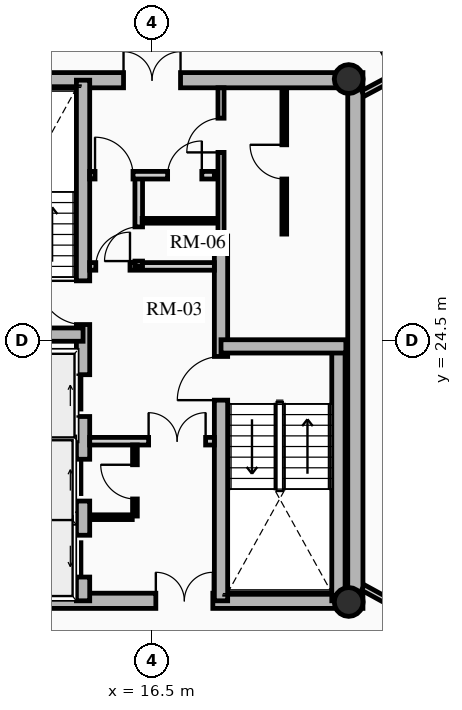
"""IFC4 building model, lengths in metres.
Left out: names, types, materials, properties, quantities, classifications, styles, units other than length and angle.
Written with IfcOpenShell. Run it as: python <this file> out.ifc"""

import sys

from ifc_helpers import new_model, si_unit, direction, frame, frame_2d, origin, origin_2d, place, context, subcontext, project, spatial, rectangle, hollow_circle, extrude, source, transform, mapped, element, fill, save


model = new_model("IFC4")
c1 = context("Model", 3, precision=1e-05, world=origin(), true_north=direction((0.0, 1.0)))
c2 = subcontext(c1, "Body", "Model", "MODEL_VIEW")
j1 = project(units=[si_unit("LENGTHUNIT", "METRE"), si_unit("PLANEANGLEUNIT", "RADIAN")], contexts=[c1])
p1 = place(None, origin())
s1 = spatial("IfcSite", under=j1, at=p1, CompositionType="ELEMENT")
p2 = place(p1, origin())
s2 = spatial("IfcBuilding", under=s1, at=p2, CompositionType="ELEMENT")
p3 = place(p2, frame((0.0, 0.0, 186.52)))
s3 = spatial("IfcBuildingStorey", under=s2, at=p3, CompositionType="ELEMENT", Elevation=186.52)
p4 = place(p3, frame((21.85, 17.45, 0.0), z_axis=(0.0, 0.0, 1.0), x_axis=(0.0, 1.0, 0.0)))
e1 = element("IfcWall", 1, at=p4, inside=s3, PredefinedType="SHEAR", context=c2, shape_type="SweptSolid", body=[
    extrude(rectangle(XDim=14.1, YDim=0.4, at=frame_2d((7.05, 0.0))), origin(), (0.0, 0.0, 1.0), 2.91),
])
p5 = place(p3, frame((11.15, 17.65, 0.0), z_axis=(0.0, 0.0, 1.0), x_axis=(1.0, 0.0, 0.0)))
e2 = element("IfcWall", 2, at=p5, inside=s3, PredefinedType="SHEAR", context=c2, shape_type="SweptSolid", body=[
    extrude(rectangle(XDim=10.7, YDim=0.4, at=frame_2d((5.35, 0.0))), origin(), (0.0, 0.0, 1.0), 2.91),
])
m1 = source(origin(), c2, "Body", "SweptSolid", [
    extrude(rectangle(XDim=1.5, YDim=2.02, at=frame_2d((0.75, 1.01))), frame((0.0, 0.21, 0.0), z_axis=(0.0, -1.0, 0.0), x_axis=(1.0, 0.0, 0.0)), (0.0, 0.0, 1.0), 0.42),
])
p6 = place(p5, frame((5.45, 0.0, 0.0)))
e3 = element("IfcOpeningElement", 3, at=p6, cuts=e2, PredefinedType="OPENING", context=c2, shape_type="MappedRepresentation", body=[
    mapped(m1, transform((0.0, 0.0, 0.0), x_axis=(1.0, 0.0, 0.0), y_axis=(0.0, 1.0, 0.0), z_axis=(0.0, 0.0, 1.0), scale=1.0)),
])
p7 = place(p3, frame((11.15, 31.35, 0.0), z_axis=(0.0, 0.0, 1.0), x_axis=(1.0, 0.0, 0.0)))
e4 = element("IfcWall", 4, at=p7, inside=s3, PredefinedType="SHEAR", context=c2, shape_type="SweptSolid", body=[
    extrude(rectangle(XDim=10.7, YDim=0.4, at=frame_2d((5.35, 0.0))), origin(), (0.0, 0.0, 1.0), 2.91),
])
p8 = place(p7, frame((4.6, 0.0, 0.0)))
e5 = element("IfcOpeningElement", 5, at=p8, cuts=e4, PredefinedType="OPENING", context=c2, shape_type="MappedRepresentation", body=[
    mapped(m1, transform((0.0, 0.0, 0.0), x_axis=(1.0, 0.0, 0.0), y_axis=(0.0, 1.0, 0.0), z_axis=(0.0, 0.0, 1.0), scale=1.0)),
])
p9 = place(p3, frame((14.685, 17.65, 0.0), z_axis=(0.0, 0.0, 1.0), x_axis=(0.0, 1.0, 0.0)))
e6 = element("IfcWall", 6, at=p9, inside=s3, PredefinedType="SHEAR", context=c2, shape_type="SweptSolid", body=[
    extrude(rectangle(XDim=13.7, YDim=0.35, at=frame_2d((6.85, 0.0))), origin(), (0.0, 0.0, 1.0), 2.91),
])
m2 = source(origin(), c2, "Body", "SweptSolid", [
    extrude(rectangle(XDim=1.1, YDim=2.015, at=frame_2d((0.55, 1.007))), frame((0.0, 0.185, 0.0), z_axis=(0.0, -1.0, 0.0), x_axis=(1.0, 0.0, 0.0)), (0.0, 0.0, 1.0), 0.37),
])
p10 = place(p9, frame((4.85, 0.0, 0.0)))
e7 = element("IfcOpeningElement", 7, at=p10, cuts=e6, PredefinedType="OPENING", context=c2, shape_type="MappedRepresentation", body=[
    mapped(m2, transform((0.0, 0.0, 0.0), x_axis=(1.0, 0.0, 0.0), y_axis=(0.0, 1.0, 0.0), z_axis=(0.0, 0.0, 1.0), scale=1.0)),
])
p11 = place(p9, frame((0.625, 0.0, 0.0)))
e8 = element("IfcOpeningElement", 8, at=p11, cuts=e6, PredefinedType="OPENING", context=c2, shape_type="MappedRepresentation", body=[
    mapped(m2, transform((0.0, 0.0, 0.0), x_axis=(1.0, 0.0, 0.0), y_axis=(0.0, 1.0, 0.0), z_axis=(0.0, 0.0, 1.0), scale=1.0)),
])
p12 = place(p9, frame((2.625, 0.0, 0.0)))
e9 = element("IfcOpeningElement", 9, at=p12, cuts=e6, PredefinedType="OPENING", context=c2, shape_type="MappedRepresentation", body=[
    mapped(m2, transform((0.0, 0.0, 0.0), x_axis=(1.0, 0.0, 0.0), y_axis=(0.0, 1.0, 0.0), z_axis=(0.0, 0.0, 1.0), scale=1.0)),
])
m3 = source(origin(), c2, "Body", "SweptSolid", [
    extrude(rectangle(XDim=1.15, YDim=2.02, at=frame_2d((0.575, 1.01))), frame((0.0, 0.185, 0.0), z_axis=(0.0, -1.0, 0.0), x_axis=(1.0, 0.0, 0.0)), (0.0, 0.0, 1.0), 0.37),
])
p13 = place(p9, frame((7.27, 0.0, 0.0)))
e10 = element("IfcOpeningElement", 10, at=p13, cuts=e6, PredefinedType="OPENING", context=c2, shape_type="MappedRepresentation", body=[
    mapped(m3, transform((0.0, 0.0, 0.0), x_axis=(1.0, 0.0, 0.0), y_axis=(0.0, 1.0, 0.0), z_axis=(0.0, 0.0, 1.0), scale=1.0)),
])
p14 = place(p3, frame((18.315, 17.65, 0.0), z_axis=(0.0, 0.0, 1.0), x_axis=(0.0, 1.0, 0.0)))
e11 = element("IfcWall", 11, at=p14, inside=s3, PredefinedType="SHEAR", context=c2, shape_type="SweptSolid", body=[
    extrude(rectangle(XDim=9.6, YDim=0.35, at=frame_2d((4.8, 0.0))), origin(), (0.0, 0.0, 1.0), 2.91),
])
p15 = place(p14, frame((5.28, 0.0, 0.0)))
e12 = element("IfcOpeningElement", 12, at=p15, cuts=e11, PredefinedType="OPENING", context=c2, shape_type="MappedRepresentation", body=[
    mapped(m3, transform((0.0, 0.0, 0.0), x_axis=(1.0, 0.0, 0.0), y_axis=(0.0, 1.0, 0.0), z_axis=(0.0, 0.0, 1.0), scale=1.0)),
])
p16 = place(p3, frame((11.4, 24.655, 0.0), z_axis=(0.0, 0.0, 1.0), x_axis=(1.0, 0.0, 0.0)))
e13 = element("IfcWall", 13, at=p16, inside=s3, PredefinedType="SHEAR", context=c2, shape_type="SweptSolid", body=[
    extrude(rectangle(XDim=3.285, YDim=0.35, at=frame_2d((1.643, 0.0))), origin(), (0.0, 0.0, 1.0), 2.91),
])
p17 = place(p3, frame((21.405, 17.65, 0.0), z_axis=(0.0, 0.0, 1.0), x_axis=(0.0, 1.0, 0.0)))
e14 = element("IfcWall", 14, at=p17, inside=s3, PredefinedType="SHEAR", context=c2, shape_type="SweptSolid", body=[
    extrude(rectangle(XDim=6.695, YDim=0.35, at=frame_2d((3.348, 0.0))), origin(), (0.0, 0.0, 1.0), 2.91),
])
p18 = place(p3, frame((18.315, 24.345, 0.0), z_axis=(0.0, 0.0, 1.0), x_axis=(1.0, 0.0, 0.0)))
e15 = element("IfcWall", 15, at=p18, inside=s3, PredefinedType="SHEAR", context=c2, shape_type="SweptSolid", body=[
    extrude(rectangle(XDim=3.285, YDim=0.35, at=frame_2d((1.643, 0.0))), origin(), (0.0, 0.0, 1.0), 2.91),
])
for number, where, z_axis, x_axis in (
    (16, (21.675, 17.62, 0.0), (0.0, 0.0, 1.0), (1.0, 0.0, 0.0)),
    (17, (21.675, 31.38, 0.0), (0.0, 0.0, 1.0), (1.0, 0.0, 0.0)),
):
    element("IfcColumn", number, at=place(p3, frame(where, z_axis=z_axis, x_axis=x_axis)), inside=s3, PredefinedType="COLUMN", context=c2, shape_type="SweptSolid", body=[
        extrude(hollow_circle(Radius=0.38, WallThickness=0.032, at=origin_2d()), origin(), (0.0, 0.0, 1.0), 2.91),
    ])
for number, where, z_axis, x_axis in (
    (18, (11.52, 21.8, 0.0), (0.0, 0.0, 1.0), (1.0, 0.0, 0.0)),
    (19, (11.52, 19.825, 0.0), (0.0, 0.0, 1.0), (1.0, 0.0, 0.0)),
):
    element("IfcWall", number, at=place(p3, frame(where, z_axis=z_axis, x_axis=x_axis)), inside=s3, PredefinedType="SHEAR", context=c2, shape_type="SweptSolid", body=[
        extrude(rectangle(XDim=2.97, YDim=0.2, at=frame_2d((1.485, 0.0))), origin(), (0.0, 0.0, 1.0), 2.91),
    ])
p19 = place(p3, frame((14.86, 21.85, 0.0), z_axis=(0.0, 0.0, 1.0), x_axis=(1.0, 0.0, 0.0)))
e20 = element("IfcWall", 20, at=p19, inside=s3, PredefinedType="PARTITIONING", context=c2, shape_type="SweptSolid", body=[
    extrude(rectangle(XDim=3.28, YDim=0.2, at=frame_2d((1.64, 0.0))), origin(), (0.0, 0.0, 1.0), 2.675),
])
m4 = source(origin(), c2, "Body", "SweptSolid", [
    extrude(rectangle(XDim=1.5, YDim=2.02, at=frame_2d((0.75, 1.01))), frame((0.0, 0.11, 0.0), z_axis=(0.0, -1.0, 0.0), x_axis=(1.0, 0.0, 0.0)), (0.0, 0.0, 1.0), 0.22),
])
p20 = place(p19, frame((1.55, 0.0, 0.0)))
e21 = element("IfcOpeningElement", 21, at=p20, cuts=e20, PredefinedType="OPENING", context=c2, shape_type="MappedRepresentation", body=[
    mapped(m4, transform((0.0, 0.0, 0.0), x_axis=(1.0, 0.0, 0.0), y_axis=(0.0, 1.0, 0.0), z_axis=(0.0, 0.0, 1.0), scale=1.0)),
])
p21 = place(p3, frame((14.86, 26.45, 0.0), z_axis=(0.0, 0.0, 1.0), x_axis=(1.0, 0.0, 0.0)))
e22 = element("IfcWall", 22, at=p21, inside=s3, PredefinedType="PARTITIONING", context=c2, shape_type="SweptSolid", body=[
    extrude(rectangle(XDim=3.28, YDim=0.2, at=frame_2d((1.64, 0.0))), origin(), (0.0, 0.0, 1.0), 2.675),
])
m5 = source(origin(), c2, "Body", "SweptSolid", [
    extrude(rectangle(XDim=0.9, YDim=2.005, at=frame_2d((0.45, 1.002))), frame((0.0, 0.11, 0.0), z_axis=(0.0, -1.0, 0.0), x_axis=(1.0, 0.0, 0.0)), (0.0, 0.0, 1.0), 0.22),
])
p22 = place(p21, frame((0.16, 0.0, 0.0)))
e23 = element("IfcOpeningElement", 23, at=p22, cuts=e22, PredefinedType="OPENING", context=c2, shape_type="MappedRepresentation", body=[
    mapped(m5, transform((0.0, 0.0, 0.0), x_axis=(1.0, 0.0, 0.0), y_axis=(0.0, 1.0, 0.0), z_axis=(0.0, 0.0, 1.0), scale=1.0)),
])
p23 = place(p3, frame((16.15, 26.45, 0.0), z_axis=(0.0, 0.0, 1.0), x_axis=(0.0, 1.0, 0.0)))
e24 = element("IfcWall", 24, at=p23, inside=s3, PredefinedType="PARTITIONING", context=c2, shape_type="SweptSolid", body=[
    extrude(rectangle(XDim=2.4, YDim=0.2, at=frame_2d((1.2, 0.0))), origin(), (0.0, 0.0, 1.0), 2.675),
])
p24 = place(p23, frame((0.14, 0.0, 0.0)))
e25 = element("IfcOpeningElement", 25, at=p24, cuts=e24, PredefinedType="OPENING", context=c2, shape_type="MappedRepresentation", body=[
    mapped(m5, transform((0.0, 0.0, 0.0), x_axis=(1.0, 0.0, 0.0), y_axis=(0.0, 1.0, 0.0), z_axis=(0.0, 0.0, 1.0), scale=1.0)),
])
p25 = place(p3, frame((14.86, 28.85, 0.0), z_axis=(0.0, 0.0, 1.0), x_axis=(1.0, 0.0, 0.0)))
e26 = element("IfcWall", 26, at=p25, inside=s3, PredefinedType="PARTITIONING", context=c2, shape_type="SweptSolid", body=[
    extrude(rectangle(XDim=3.28, YDim=0.2, at=frame_2d((1.64, 0.0))), origin(), (0.0, 0.0, 1.0), 2.675),
])
m6 = source(origin(), c2, "Body", "SweptSolid", [
    extrude(rectangle(XDim=1.0, YDim=2.015, at=frame_2d((0.5, 1.007))), frame((0.0, 0.11, 0.0), z_axis=(0.0, -1.0, 0.0), x_axis=(1.0, 0.0, 0.0)), (0.0, 0.0, 1.0), 0.22),
])
p26 = place(p25, frame((0.14, 0.0, 0.0)))
e27 = element("IfcOpeningElement", 27, at=p26, cuts=e26, PredefinedType="OPENING", context=c2, shape_type="MappedRepresentation", body=[
    mapped(m6, transform((0.0, 0.0, 0.0), x_axis=(1.0, 0.0, 0.0), y_axis=(0.0, 1.0, 0.0), z_axis=(0.0, 0.0, 1.0), scale=1.0)),
])
p27 = place(p25, frame((2.05, 0.0, 0.0)))
e28 = element("IfcOpeningElement", 28, at=p27, cuts=e26, PredefinedType="OPENING", context=c2, shape_type="MappedRepresentation", body=[
    mapped(m5, transform((0.0, 0.0, 0.0), x_axis=(1.0, 0.0, 0.0), y_axis=(0.0, 1.0, 0.0), z_axis=(0.0, 0.0, 1.0), scale=1.0)),
])
p28 = place(p3, frame((16.05, 19.88, 0.0), z_axis=(0.0, 0.0, 1.0), x_axis=(0.0, 1.0, 0.0)))
e29 = element("IfcWall", 29, at=p28, inside=s3, PredefinedType="PARTITIONING", context=c2, shape_type="SweptSolid", body=[
    extrude(rectangle(XDim=1.87, YDim=0.125, at=frame_2d((0.935, 0.0))), origin(), (0.0, 0.0, 1.0), 2.675),
])
m7 = source(origin(), c2, "Body", "SweptSolid", [
    extrude(rectangle(XDim=0.9, YDim=2.005, at=frame_2d((0.45, 1.002))), frame((0.0, 0.073, 0.0), z_axis=(0.0, -1.0, 0.0), x_axis=(1.0, 0.0, 0.0)), (0.0, 0.0, 1.0), 0.145),
])
p29 = place(p28, frame((0.45, 0.0, 0.0)))
e30 = element("IfcOpeningElement", 30, at=p29, cuts=e29, PredefinedType="OPENING", context=c2, shape_type="MappedRepresentation", body=[
    mapped(m7, transform((0.0, 0.0, 0.0), x_axis=(1.0, 0.0, 0.0), y_axis=(0.0, 1.0, 0.0), z_axis=(0.0, 0.0, 1.0), scale=1.0)),
])
p30 = place(p3, frame((14.88, 19.85, 0.0), z_axis=(0.0, 0.0, 1.0), x_axis=(1.0, 0.0, 0.0)))
e31 = element("IfcWall", 31, at=p30, inside=s3, PredefinedType="PARTITIONING", context=c2, shape_type="SweptSolid", body=[
    extrude(rectangle(XDim=1.1, YDim=0.125, at=frame_2d((0.55, 0.0))), origin(), (0.0, 0.0, 1.0), 2.675),
])
p31 = place(p3, frame((16.24, 27.65, 0.0), z_axis=(0.0, 0.0, 1.0), x_axis=(1.0, 0.0, 0.0)))
e32 = element("IfcWall", 32, at=p31, inside=s3, PredefinedType="PARTITIONING", context=c2, shape_type="SweptSolid", body=[
    extrude(rectangle(XDim=1.88, YDim=0.125, at=frame_2d((0.94, 0.0))), origin(), (0.0, 0.0, 1.0), 2.675),
])
p32 = place(p3, frame((18.315, 27.25, 0.0), z_axis=(0.0, 0.0, 1.0), x_axis=(0.0, 1.0, 0.0)))
e33 = element("IfcWall", 33, at=p32, inside=s3, PredefinedType="PARTITIONING", context=c2, shape_type="SweptSolid", body=[
    extrude(rectangle(XDim=3.9, YDim=0.16, at=frame_2d((1.95, 0.0))), origin(), (0.0, 0.0, 1.0), 2.675),
])
m8 = source(origin(), c2, "Body", "SweptSolid", [
    extrude(rectangle(XDim=0.9, YDim=2.005, at=frame_2d((0.45, 1.002))), frame((0.0, 0.09, 0.0), z_axis=(0.0, -1.0, 0.0), x_axis=(1.0, 0.0, 0.0)), (0.0, 0.0, 1.0), 0.18),
])
p33 = place(p32, frame((2.2, 0.0, 0.0)))
e34 = element("IfcOpeningElement", 34, at=p33, cuts=e33, PredefinedType="OPENING", context=c2, shape_type="MappedRepresentation", body=[
    mapped(m8, transform((0.0, 0.0, 0.0), x_axis=(1.0, 0.0, 0.0), y_axis=(0.0, 1.0, 0.0), z_axis=(0.0, 0.0, 1.0), scale=1.0)),
])
p34 = place(p3, frame((19.98, 27.3, 0.0), z_axis=(0.0, 0.0, 1.0), x_axis=(0.0, 1.0, 0.0)))
e35 = element("IfcWall", 35, at=p34, inside=s3, PredefinedType="PARTITIONING", context=c2, shape_type="SweptSolid", body=[
    extrude(rectangle(XDim=3.82, YDim=0.125, at=frame_2d((1.91, 0.0))), origin(), (0.0, 0.0, 1.0), 2.675),
])
p35 = place(p34, frame((1.45, 0.0, 0.0)))
e36 = element("IfcOpeningElement", 36, at=p35, cuts=e35, PredefinedType="OPENING", context=c2, shape_type="MappedRepresentation", body=[
    mapped(m7, transform((0.0, 0.0, 0.0), x_axis=(1.0, 0.0, 0.0), y_axis=(0.0, 1.0, 0.0), z_axis=(0.0, 0.0, 1.0), scale=1.0)),
])
p36 = place(p3, frame((22.05, 31.0, 0.0), z_axis=(0.0, 0.0, 1.0), x_axis=(0.882791584709, 0.469764853908, 0.0)))
e37 = element("IfcWall", 37, at=p36, inside=s3, PredefinedType="PARTITIONING", context=c2, shape_type="SweptSolid", body=[
    extrude(rectangle(XDim=2.186, YDim=0.16, at=frame_2d((1.093, 0.0))), origin(), (0.0, 0.0, 1.0), 2.245),
])
m9 = source(origin(), c2, "Body", "SweptSolid", [
    extrude(rectangle(XDim=1.05, YDim=2.015, at=frame_2d((0.525, 1.007))), frame((0.0, 0.09, 0.0), z_axis=(0.0, -1.0, 0.0), x_axis=(1.0, 0.0, 0.0)), (0.0, 0.0, 1.0), 0.18),
])
p37 = place(p36, frame((0.936, 0.0, 0.0)))
e38 = element("IfcOpeningElement", 38, at=p37, cuts=e37, PredefinedType="OPENING", context=c2, shape_type="MappedRepresentation", body=[
    mapped(m9, transform((0.0, 0.0, 0.0), x_axis=(1.0, 0.0, 0.0), y_axis=(0.0, 1.0, 0.0), z_axis=(0.0, 0.0, 1.0), scale=1.0)),
])
p38 = place(p3, frame((22.05, 18.0, 0.0), z_axis=(0.0, 0.0, 1.0), x_axis=(0.877252891813, -0.480028503118, 0.0)))
e39 = element("IfcWall", 39, at=p38, inside=s3, PredefinedType="PARTITIONING", context=c2, shape_type="SweptSolid", body=[
    extrude(rectangle(XDim=2.282, YDim=0.16, at=frame_2d((1.141, 0.0))), origin(), (0.0, 0.0, 1.0), 2.245),
])
p39 = place(p38, frame((1.032, 0.0, 0.0)))
e40 = element("IfcOpeningElement", 40, at=p39, cuts=e39, PredefinedType="OPENING", context=c2, shape_type="MappedRepresentation", body=[
    mapped(m9, transform((0.0, 0.0, 0.0), x_axis=(1.0, 0.0, 0.0), y_axis=(0.0, 1.0, 0.0), z_axis=(0.0, 0.0, 1.0), scale=1.0)),
])
m10 = source(origin(), c2, "Body", "SweptSolid", [
    extrude(rectangle(XDim=1.1, YDim=2.015, at=frame_2d((0.55, 1.007))), frame((0.0, 0.025, 0.0), z_axis=(0.0, -1.0, 0.0), x_axis=(1.0, 0.0, 0.0)), (0.0, 0.0, 1.0), 0.05),
])
p40 = place(p10, origin())
e41 = element("IfcDoor", 41, at=p40, inside=s3, OperationType="SLIDING_TO_RIGHT", PredefinedType="DOOR", context=c2, shape_type="MappedRepresentation", body=[
    mapped(m10, transform((0.0, 0.0, 0.0), x_axis=(1.0, 0.0, 0.0), y_axis=(0.0, 1.0, 0.0), z_axis=(0.0, 0.0, 1.0), scale=1.0)),
])
fill(e7, e41)
p41 = place(p11, origin())
e42 = element("IfcDoor", 42, at=p41, inside=s3, OperationType="SLIDING_TO_LEFT", PredefinedType="DOOR", context=c2, shape_type="MappedRepresentation", body=[
    mapped(m10, transform((0.0, 0.0, 0.0), x_axis=(1.0, 0.0, 0.0), y_axis=(0.0, 1.0, 0.0), z_axis=(0.0, 0.0, 1.0), scale=1.0)),
])
fill(e8, e42)
p42 = place(p12, origin())
e43 = element("IfcDoor", 43, at=p42, inside=s3, OperationType="SLIDING_TO_RIGHT", PredefinedType="DOOR", context=c2, shape_type="MappedRepresentation", body=[
    mapped(m10, transform((0.0, 0.0, 0.0), x_axis=(1.0, 0.0, 0.0), y_axis=(0.0, 1.0, 0.0), z_axis=(0.0, 0.0, 1.0), scale=1.0)),
])
fill(e9, e43)
m11 = source(origin(), c2, "Body", "SweptSolid", [
    extrude(rectangle(XDim=1.15, YDim=2.02, at=frame_2d((0.575, 1.01))), frame((0.0, 0.025, 0.0), z_axis=(0.0, -1.0, 0.0), x_axis=(1.0, 0.0, 0.0)), (0.0, 0.0, 1.0), 0.05),
])
p43 = place(p13, origin())
e44 = element("IfcDoor", 44, at=p43, inside=s3, OperationType="SINGLE_SWING_RIGHT", PredefinedType="DOOR", context=c2, shape_type="MappedRepresentation", body=[
    mapped(m11, transform((0.0, 0.0, 0.0), x_axis=(1.0, 0.0, 0.0), y_axis=(0.0, 1.0, 0.0), z_axis=(0.0, 0.0, 1.0), scale=1.0)),
])
fill(e10, e44)
p44 = place(p15, origin())
e45 = element("IfcDoor", 45, at=p44, inside=s3, OperationType="SINGLE_SWING_LEFT", PredefinedType="DOOR", context=c2, shape_type="MappedRepresentation", body=[
    mapped(m11, transform((0.0, 0.0, 0.0), x_axis=(1.0, 0.0, 0.0), y_axis=(0.0, 1.0, 0.0), z_axis=(0.0, 0.0, 1.0), scale=1.0)),
])
fill(e12, e45)
m12 = source(origin(), c2, "Body", "SweptSolid", [
    extrude(rectangle(XDim=1.5, YDim=2.02, at=frame_2d((0.75, 1.01))), frame((0.0, 0.025, 0.0), z_axis=(0.0, -1.0, 0.0), x_axis=(1.0, 0.0, 0.0)), (0.0, 0.0, 1.0), 0.05),
])
p45 = place(p8, origin())
e46 = element("IfcDoor", 46, at=p45, inside=s3, OperationType="DOUBLE_DOOR_SINGLE_SWING", PredefinedType="DOOR", context=c2, shape_type="MappedRepresentation", body=[
    mapped(m12, transform((0.0, 0.0, 0.0), x_axis=(1.0, 0.0, 0.0), y_axis=(0.0, 1.0, 0.0), z_axis=(0.0, 0.0, 1.0), scale=1.0)),
])
fill(e5, e46)
p46 = place(p6, origin())
e47 = element("IfcDoor", 47, at=p46, inside=s3, OperationType="DOUBLE_DOOR_SINGLE_SWING", PredefinedType="DOOR", context=c2, shape_type="MappedRepresentation", body=[
    mapped(m12, transform((0.0, 0.0, 0.0), x_axis=(1.0, 0.0, 0.0), y_axis=(0.0, 1.0, 0.0), z_axis=(0.0, 0.0, 1.0), scale=1.0)),
])
fill(e3, e47)
p47 = place(p20, origin())
e48 = element("IfcDoor", 48, at=p47, inside=s3, OperationType="DOUBLE_DOOR_SINGLE_SWING", PredefinedType="DOOR", context=c2, shape_type="MappedRepresentation", body=[
    mapped(m12, transform((0.0, 0.0, 0.0), x_axis=(1.0, 0.0, 0.0), y_axis=(0.0, 1.0, 0.0), z_axis=(0.0, 0.0, 1.0), scale=1.0)),
])
fill(e21, e48)
m13 = source(origin(), c2, "Body", "SweptSolid", [
    extrude(rectangle(XDim=0.9, YDim=2.005, at=frame_2d((0.45, 1.002))), frame((0.0, 0.025, 0.0), z_axis=(0.0, -1.0, 0.0), x_axis=(1.0, 0.0, 0.0)), (0.0, 0.0, 1.0), 0.05),
])
p48 = place(p22, origin())
e49 = element("IfcDoor", 49, at=p48, inside=s3, OperationType="SINGLE_SWING_RIGHT", PredefinedType="DOOR", context=c2, shape_type="MappedRepresentation", body=[
    mapped(m13, transform((0.0, 0.0, 0.0), x_axis=(1.0, 0.0, 0.0), y_axis=(0.0, 1.0, 0.0), z_axis=(0.0, 0.0, 1.0), scale=1.0)),
])
fill(e23, e49)
m14 = source(origin(), c2, "Body", "SweptSolid", [
    extrude(rectangle(XDim=1.0, YDim=2.015, at=frame_2d((0.5, 1.007))), frame((0.0, 0.025, 0.0), z_axis=(0.0, -1.0, 0.0), x_axis=(1.0, 0.0, 0.0)), (0.0, 0.0, 1.0), 0.05),
])
p49 = place(p26, origin())
e50 = element("IfcDoor", 50, at=p49, inside=s3, OperationType="SINGLE_SWING_LEFT", PredefinedType="DOOR", context=c2, shape_type="MappedRepresentation", body=[
    mapped(m14, transform((0.0, 0.0, 0.0), x_axis=(1.0, 0.0, 0.0), y_axis=(0.0, 1.0, 0.0), z_axis=(0.0, 0.0, 1.0), scale=1.0)),
])
fill(e27, e50)
p50 = place(p29, origin())
e51 = element("IfcDoor", 51, at=p50, inside=s3, OperationType="SINGLE_SWING_RIGHT", PredefinedType="DOOR", context=c2, shape_type="MappedRepresentation", body=[
    mapped(m13, transform((0.0, 0.0, 0.0), x_axis=(1.0, 0.0, 0.0), y_axis=(0.0, 1.0, 0.0), z_axis=(0.0, 0.0, 1.0), scale=1.0)),
])
fill(e30, e51)
p51 = place(p24, origin())
e52 = element("IfcDoor", 52, at=p51, inside=s3, OperationType="SINGLE_SWING_LEFT", PredefinedType="DOOR", context=c2, shape_type="MappedRepresentation", body=[
    mapped(m13, transform((0.0, 0.0, 0.0), x_axis=(1.0, 0.0, 0.0), y_axis=(0.0, 1.0, 0.0), z_axis=(0.0, 0.0, 1.0), scale=1.0)),
])
fill(e25, e52)
p52 = place(p27, origin())
e53 = element("IfcDoor", 53, at=p52, inside=s3, OperationType="SINGLE_SWING_RIGHT", PredefinedType="DOOR", context=c2, shape_type="MappedRepresentation", body=[
    mapped(m13, transform((0.0, 0.0, 0.0), x_axis=(1.0, 0.0, 0.0), y_axis=(0.0, 1.0, 0.0), z_axis=(0.0, 0.0, 1.0), scale=1.0)),
])
fill(e28, e53)
p53 = place(p33, origin())
e54 = element("IfcDoor", 54, at=p53, inside=s3, OperationType="SINGLE_SWING_LEFT", PredefinedType="DOOR", context=c2, shape_type="MappedRepresentation", body=[
    mapped(m13, transform((0.0, 0.0, 0.0), x_axis=(1.0, 0.0, 0.0), y_axis=(0.0, 1.0, 0.0), z_axis=(0.0, 0.0, 1.0), scale=1.0)),
])
fill(e34, e54)
p54 = place(p35, origin())
e55 = element("IfcDoor", 55, at=p54, inside=s3, OperationType="SINGLE_SWING_RIGHT", PredefinedType="DOOR", context=c2, shape_type="MappedRepresentation", body=[
    mapped(m13, transform((0.0, 0.0, 0.0), x_axis=(1.0, 0.0, 0.0), y_axis=(0.0, 1.0, 0.0), z_axis=(0.0, 0.0, 1.0), scale=1.0)),
])
fill(e36, e55)
save(model, sys.argv[1])
